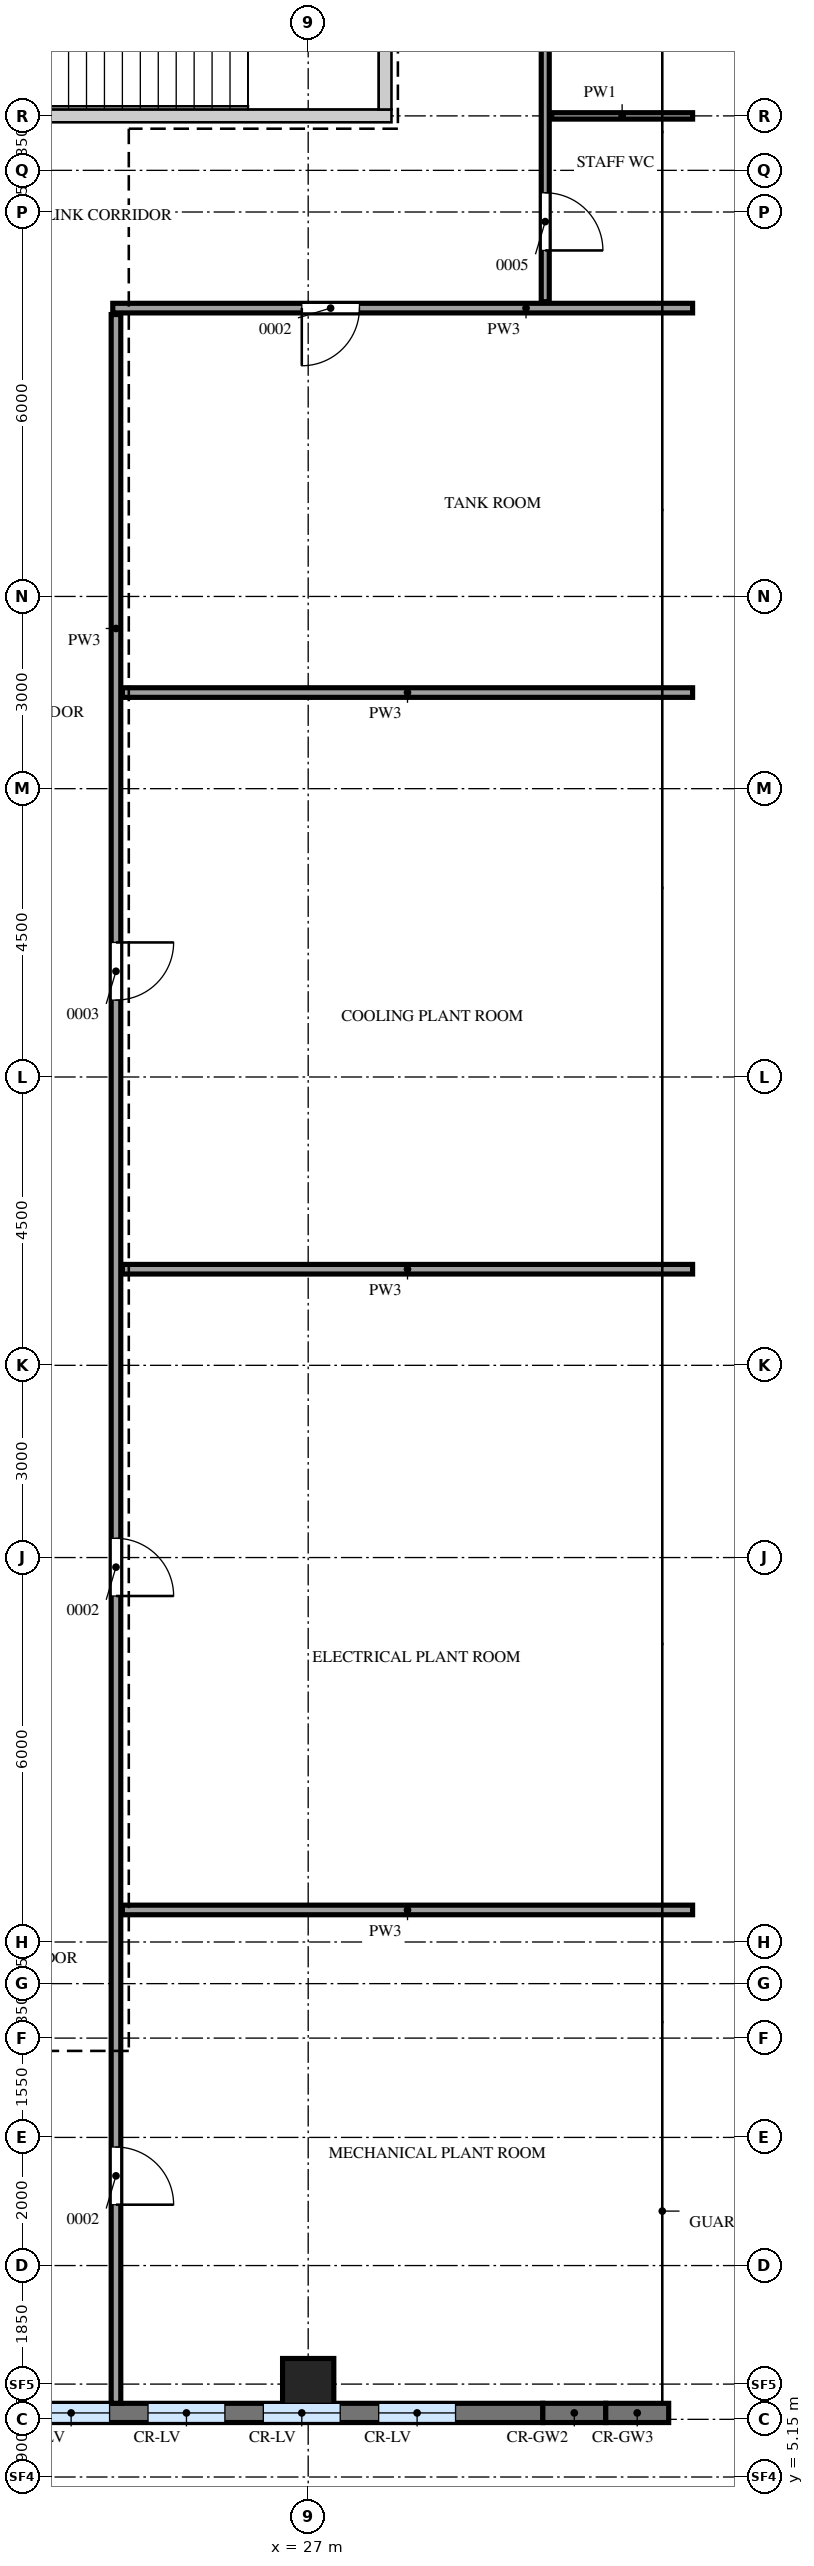
"""IFC4 building model, lengths in metres.
Left out: names, types, materials, properties, quantities, classifications, styles, units other than length and angle.
Written with IfcOpenShell. Run it as: python <this file> out.ifc"""

import sys

from ifc_helpers import new_model, si_unit, direction, frame, frame_2d, origin, origin_2d, place, context, subcontext, project, spatial, rectangle, extrude, source, transform, mapped, element, fill, save


model = new_model("IFC4")
c1 = context("Model", 3, precision=1e-05, world=origin(), true_north=direction((0.0, 1.0)))
c2 = subcontext(c1, "Body", "Model", "MODEL_VIEW")
j1 = project(units=[si_unit("LENGTHUNIT", "METRE"), si_unit("PLANEANGLEUNIT", "RADIAN")], contexts=[c1])
p1 = place(None, origin())
s1 = spatial("IfcSite", under=j1, at=p1, CompositionType="ELEMENT")
p2 = place(p1, origin())
s2 = spatial("IfcBuilding", under=s1, at=p2, CompositionType="ELEMENT")
p3 = place(p2, frame((0.0, 0.0, 339.2)))
s3 = spatial("IfcBuildingStorey", under=s2, at=p3, CompositionType="ELEMENT", Elevation=339.2)
m1 = source(origin(), c2, "Body", "SweptSolid", [
    extrude(rectangle(XDim=7.1, YDim=0.2, at=frame_2d((3.55, 0.0))), origin(), (0.0, 0.0, 1.0), 4.25),
])
p4 = place(p3, frame((21.2, 42.0, 0.0), z_axis=(0.0, 0.0, 1.0), x_axis=(1.0, 0.0, 0.0)))
e1 = element("IfcWall", 1, at=p4, inside=s3, PredefinedType="SHEAR", context=c2, shape_type="MappedRepresentation", body=[
    mapped(m1, transform((0.0, 0.0, 0.0))),
])
m2 = source(origin(), c2, "Body", "SweptSolid", [
    extrude(rectangle(XDim=3.35, YDim=0.2, at=frame_2d((1.675, 0.0))), origin(), (0.0, 0.0, 1.0), 4.25),
])
p5 = place(p3, frame((28.2, 42.1, 0.0), z_axis=(0.0, 0.0, 1.0), x_axis=(0.0, 1.0, 0.0)))
e2 = element("IfcWall", 2, at=p5, inside=s3, PredefinedType="SHEAR", context=c2, shape_type="MappedRepresentation", body=[
    mapped(m2, transform((0.0, 0.0, 0.0))),
])
m3 = source(origin(), c2, "Body", "SweptSolid", [
    extrude(rectangle(XDim=0.8, YDim=0.8, at=origin_2d()), origin(), (0.0, 0.0, 1.0), 4.5),
])
p6 = place(p3, frame((27.0, 6.6, 0.0), z_axis=(0.0, 0.0, 1.0), x_axis=(1.0, 0.0, 0.0)))
e3 = element("IfcColumn", 3, at=p6, inside=s3, PredefinedType="COLUMN", context=c2, shape_type="MappedRepresentation", body=[
    mapped(m3, transform((0.0, 0.0, 0.0))),
])
m4 = source(origin(), c2, "Body", "SweptSolid", [
    extrude(rectangle(XDim=18.362, YDim=0.3, at=frame_2d((9.181, 0.0))), origin(), (0.0, 0.0, 1.0), 4.5),
])
p7 = place(p3, frame((12.3, 6.15, 0.0), z_axis=(0.0, 0.0, 1.0), x_axis=(1.0, 0.0, 0.0)))
e4 = element("IfcWall", 4, at=p7, inside=s3, PredefinedType="SOLIDWALL", context=c2, shape_type="MappedRepresentation", body=[
    mapped(m4, transform((0.0, 0.0, 0.0))),
])
m5 = source(origin(), c2, "Body", "SweptSolid", [
    extrude(rectangle(XDim=1.2, YDim=2.4, at=frame_2d((0.6, 1.2))), frame((0.0, 0.16, 0.0), z_axis=(0.0, -1.0, 0.0), x_axis=(1.0, 0.0, 0.0)), (0.0, 0.0, 1.0), 0.32),
])
p8 = place(p7, frame((1.4, 0.0, 0.9)))
e5 = element("IfcOpeningElement", 5, at=p8, cuts=e4, PredefinedType="OPENING", context=c2, shape_type="MappedRepresentation", body=[
    mapped(m5, transform((0.0, 0.0, 0.0))),
])
p9 = place(p7, frame((3.2, 0.0, 0.9)))
e6 = element("IfcOpeningElement", 6, at=p9, cuts=e4, PredefinedType="OPENING", context=c2, shape_type="MappedRepresentation", body=[
    mapped(m5, transform((0.0, 0.0, 0.0))),
])
p10 = place(p7, frame((5.0, 0.0, 0.9)))
e7 = element("IfcOpeningElement", 7, at=p10, cuts=e4, PredefinedType="OPENING", context=c2, shape_type="MappedRepresentation", body=[
    mapped(m5, transform((0.0, 0.0, 0.0))),
])
p11 = place(p7, frame((6.8, 0.0, 0.9)))
e8 = element("IfcOpeningElement", 8, at=p11, cuts=e4, PredefinedType="OPENING", context=c2, shape_type="MappedRepresentation", body=[
    mapped(m5, transform((0.0, 0.0, 0.0))),
])
p12 = place(p7, frame((8.6, 0.0, 0.9)))
e9 = element("IfcOpeningElement", 9, at=p12, cuts=e4, PredefinedType="OPENING", context=c2, shape_type="MappedRepresentation", body=[
    mapped(m5, transform((0.0, 0.0, 0.0))),
])
p13 = place(p7, frame((10.4, 0.0, 0.9)))
e10 = element("IfcOpeningElement", 10, at=p13, cuts=e4, PredefinedType="OPENING", context=c2, shape_type="MappedRepresentation", body=[
    mapped(m5, transform((0.0, 0.0, 0.0))),
])
p14 = place(p7, frame((12.2, 0.0, 0.9)))
e11 = element("IfcOpeningElement", 11, at=p14, cuts=e4, PredefinedType="OPENING", context=c2, shape_type="MappedRepresentation", body=[
    mapped(m5, transform((0.0, 0.0, 0.0))),
])
p15 = place(p7, frame((14.0, 0.0, 0.9)))
e12 = element("IfcOpeningElement", 12, at=p15, cuts=e4, PredefinedType="OPENING", context=c2, shape_type="MappedRepresentation", body=[
    mapped(m5, transform((0.0, 0.0, 0.0))),
])
p16 = place(p7, frame((15.8, 0.0, 0.9)))
e13 = element("IfcOpeningElement", 13, at=p16, cuts=e4, PredefinedType="OPENING", context=c2, shape_type="MappedRepresentation", body=[
    mapped(m5, transform((0.0, 0.0, 0.0))),
])
m6 = source(origin(), c2, "Body", "SweptSolid", [
    extrude(rectangle(XDim=0.982, YDim=0.3, at=frame_2d((0.491, 0.0))), origin(), (0.0, 0.0, 1.0), 4.05),
])
p17 = place(p3, frame((30.662, 6.15, 0.0), z_axis=(0.0, 0.0, 1.0), x_axis=(1.0, 0.0, 0.0)))
e14 = element("IfcWall", 14, at=p17, inside=s3, PredefinedType="SOLIDWALL", context=c2, shape_type="MappedRepresentation", body=[
    mapped(m6, transform((0.0, 0.0, 0.0))),
])
m7 = source(origin(), c2, "Body", "SweptSolid", [
    extrude(rectangle(XDim=0.982, YDim=0.3, at=frame_2d((0.491, 0.0))), origin(), (0.0, 0.0, 1.0), 2.3),
])
p18 = place(p3, frame((31.645, 6.15, 0.0), z_axis=(0.0, 0.0, 1.0), x_axis=(1.0, 0.0, 0.0)))
e15 = element("IfcWall", 15, at=p18, inside=s3, PredefinedType="SOLIDWALL", context=c2, shape_type="MappedRepresentation", body=[
    mapped(m7, transform((0.0, 0.0, 0.0))),
])
m8 = source(origin(), c2, "Body", "SweptSolid", [
    extrude(rectangle(XDim=32.6, YDim=0.15, at=frame_2d((16.3, 0.0))), origin(), (0.0, 0.0, 1.0), 4.3),
])
p19 = place(p3, frame((24.0, 6.3, 0.0), z_axis=(0.0, 0.0, 1.0), x_axis=(0.0, 1.0, 0.0)))
e16 = element("IfcWall", 16, at=p19, inside=s3, PredefinedType="PARTITIONING", context=c2, shape_type="MappedRepresentation", body=[
    mapped(m8, transform((0.0, 0.0, 0.0))),
])
m9 = source(origin(), c2, "Body", "SweptSolid", [
    extrude(rectangle(XDim=0.9, YDim=2.1, at=frame_2d((0.45, 1.05))), frame((0.0, 0.085, 0.0), z_axis=(0.0, -1.0, 0.0), x_axis=(1.0, 0.0, 0.0)), (0.0, 0.0, 1.0), 0.17),
])
p20 = place(p19, frame((3.1, 0.0, 0.0)))
e17 = element("IfcOpeningElement", 17, at=p20, cuts=e16, PredefinedType="OPENING", context=c2, shape_type="MappedRepresentation", body=[
    mapped(m9, transform((0.0, 0.0, 0.0))),
])
p21 = place(p19, frame((12.6, 0.0, 0.0)))
e18 = element("IfcOpeningElement", 18, at=p21, cuts=e16, PredefinedType="OPENING", context=c2, shape_type="MappedRepresentation", body=[
    mapped(m9, transform((0.0, 0.0, 0.0))),
])
p22 = place(p19, frame((21.9, 0.0, 0.0)))
e19 = element("IfcOpeningElement", 19, at=p22, cuts=e16, PredefinedType="OPENING", context=c2, shape_type="MappedRepresentation", body=[
    mapped(m9, transform((0.0, 0.0, 0.0))),
])
m10 = source(origin(), c2, "Body", "SweptSolid", [
    extrude(rectangle(XDim=8.9, YDim=0.15, at=frame_2d((4.45, 0.0))), origin(), (0.0, 0.0, 1.0), 4.3),
])
for number, where, z_axis, x_axis in (
    (20, (24.1, 14.0, 0.0), (0.0, 0.0, 1.0), (1.0, 0.0, 0.0)),
    (21, (24.1, 24.0, 0.0), (0.0, 0.0, 1.0), (1.0, 0.0, 0.0)),
    (22, (24.1, 33.0, 0.0), (0.0, 0.0, 1.0), (1.0, 0.0, 0.0)),
):
    element("IfcWall", number, at=place(p3, frame(where, z_axis=z_axis, x_axis=x_axis)), inside=s3, PredefinedType="PARTITIONING", context=c2, shape_type="MappedRepresentation", body=[
        mapped(m10, transform((0.0, 0.0, 0.0))),
    ])
m11 = source(origin(), c2, "Body", "SweptSolid", [
    extrude(rectangle(XDim=9.05, YDim=0.15, at=frame_2d((4.525, 0.0))), origin(), (0.0, 0.0, 1.0), 4.3),
])
p23 = place(p3, frame((23.95, 39.0, 0.0), z_axis=(0.0, 0.0, 1.0), x_axis=(1.0, 0.0, 0.0)))
e23 = element("IfcWall", 23, at=p23, inside=s3, PredefinedType="PARTITIONING", context=c2, shape_type="MappedRepresentation", body=[
    mapped(m11, transform((0.0, 0.0, 0.0))),
])
p24 = place(p23, frame((2.95, 0.0, 0.0)))
e24 = element("IfcOpeningElement", 24, at=p24, cuts=e23, PredefinedType="OPENING", context=c2, shape_type="MappedRepresentation", body=[
    mapped(m9, transform((0.0, 0.0, 0.0))),
])
m12 = source(origin(), c2, "Body", "SweptSolid", [
    extrude(rectangle(XDim=8.6, YDim=0.125, at=frame_2d((4.3, 0.0))), origin(), (0.0, 0.0, 1.0), 4.3),
])
p25 = place(p3, frame((30.7, 39.1, 0.0), z_axis=(0.0, 0.0, 1.0), x_axis=(0.0, 1.0, 0.0)))
e25 = element("IfcWall", 25, at=p25, inside=s3, PredefinedType="PARTITIONING", context=c2, shape_type="MappedRepresentation", body=[
    mapped(m12, transform((0.0, 0.0, 0.0))),
])
m13 = source(origin(), c2, "Body", "SweptSolid", [
    extrude(rectangle(XDim=0.9, YDim=2.1, at=frame_2d((0.45, 1.05))), frame((0.0, 0.073, 0.0), z_axis=(0.0, -1.0, 0.0), x_axis=(1.0, 0.0, 0.0)), (0.0, 0.0, 1.0), 0.145),
])
p26 = place(p25, frame((0.8, 0.0, 0.0)))
e26 = element("IfcOpeningElement", 26, at=p26, cuts=e25, PredefinedType="OPENING", context=c2, shape_type="MappedRepresentation", body=[
    mapped(m13, transform((0.0, 0.0, 0.0))),
])
m14 = source(origin(), c2, "Body", "SweptSolid", [
    extrude(rectangle(XDim=1.2, YDim=2.1, at=frame_2d((0.6, 1.05))), frame((0.0, 0.073, 0.0), z_axis=(0.0, -1.0, 0.0), x_axis=(1.0, 0.0, 0.0)), (0.0, 0.0, 1.0), 0.145),
])
p27 = place(p25, frame((4.1, 0.0, 0.0)))
e27 = element("IfcOpeningElement", 27, at=p27, cuts=e25, PredefinedType="OPENING", context=c2, shape_type="MappedRepresentation", body=[
    mapped(m14, transform((0.0, 0.0, 0.0))),
])
m15 = source(origin(), c2, "Body", "SweptSolid", [
    extrude(rectangle(XDim=2.2, YDim=0.1, at=frame_2d((1.1, 0.0))), origin(), (0.0, 0.0, 1.0), 4.3),
])
p28 = place(p3, frame((30.8, 42.0, 0.0), z_axis=(0.0, 0.0, 1.0), x_axis=(1.0, 0.0, 0.0)))
e28 = element("IfcWall", 28, at=p28, inside=s3, PredefinedType="PARTITIONING", context=c2, shape_type="MappedRepresentation", body=[
    mapped(m15, transform((0.0, 0.0, 0.0))),
])
m16 = source(origin(), c2, "Body", "SweptSolid", [
    extrude(rectangle(XDim=1.2, YDim=2.4, at=frame_2d((0.6, 1.2))), frame((0.0, 0.03, 0.0), z_axis=(0.0, -1.0, 0.0), x_axis=(1.0, 0.0, 0.0)), (0.0, 0.0, 1.0), 0.06),
])
p29 = place(p13, origin())
e29 = element("IfcWindow", 29, at=p29, inside=s3, PartitioningType="SINGLE_PANEL", PredefinedType="WINDOW", context=c2, shape_type="MappedRepresentation", body=[
    mapped(m16, transform((0.0, 0.0, 0.0))),
])
fill(e10, e29)
p30 = place(p14, origin())
e30 = element("IfcWindow", 30, at=p30, inside=s3, PartitioningType="SINGLE_PANEL", PredefinedType="WINDOW", context=c2, shape_type="MappedRepresentation", body=[
    mapped(m16, transform((0.0, 0.0, 0.0))),
])
fill(e11, e30)
p31 = place(p15, origin())
e31 = element("IfcWindow", 31, at=p31, inside=s3, PartitioningType="SINGLE_PANEL", PredefinedType="WINDOW", context=c2, shape_type="MappedRepresentation", body=[
    mapped(m16, transform((0.0, 0.0, 0.0))),
])
fill(e12, e31)
p32 = place(p16, origin())
e32 = element("IfcWindow", 32, at=p32, inside=s3, PartitioningType="SINGLE_PANEL", PredefinedType="WINDOW", context=c2, shape_type="MappedRepresentation", body=[
    mapped(m16, transform((0.0, 0.0, 0.0))),
])
fill(e13, e32)
m17 = source(origin(), c2, "Body", "SweptSolid", [
    extrude(rectangle(XDim=0.9, YDim=2.1, at=frame_2d((0.45, 1.05))), frame((0.0, 0.025, 0.0), z_axis=(0.0, -1.0, 0.0), x_axis=(1.0, 0.0, 0.0)), (0.0, 0.0, 1.0), 0.05),
])
p33 = place(p20, origin())
e33 = element("IfcDoor", 33, at=p33, inside=s3, OperationType="SINGLE_SWING_LEFT", PredefinedType="DOOR", context=c2, shape_type="MappedRepresentation", body=[
    mapped(m17, transform((0.0, 0.0, 0.0))),
])
fill(e17, e33)
p34 = place(p21, origin())
e34 = element("IfcDoor", 34, at=p34, inside=s3, OperationType="SINGLE_SWING_LEFT", PredefinedType="DOOR", context=c2, shape_type="MappedRepresentation", body=[
    mapped(m17, transform((0.0, 0.0, 0.0))),
])
fill(e18, e34)
p35 = place(p22, origin())
e35 = element("IfcDoor", 35, at=p35, inside=s3, OperationType="SINGLE_SWING_RIGHT", PredefinedType="DOOR", context=c2, shape_type="MappedRepresentation", body=[
    mapped(m17, transform((0.0, 0.0, 0.0))),
])
fill(e19, e35)
p36 = place(p24, origin())
e36 = element("IfcDoor", 36, at=p36, inside=s3, OperationType="SINGLE_SWING_LEFT", PredefinedType="DOOR", context=c2, shape_type="MappedRepresentation", body=[
    mapped(m17, transform((0.0, 0.0, 0.0))),
])
fill(e24, e36)
p37 = place(p26, origin())
e37 = element("IfcDoor", 37, at=p37, inside=s3, OperationType="SINGLE_SWING_LEFT", PredefinedType="DOOR", context=c2, shape_type="MappedRepresentation", body=[
    mapped(m17, transform((0.0, 0.0, 0.0))),
])
fill(e26, e37)
save(model, sys.argv[1])
